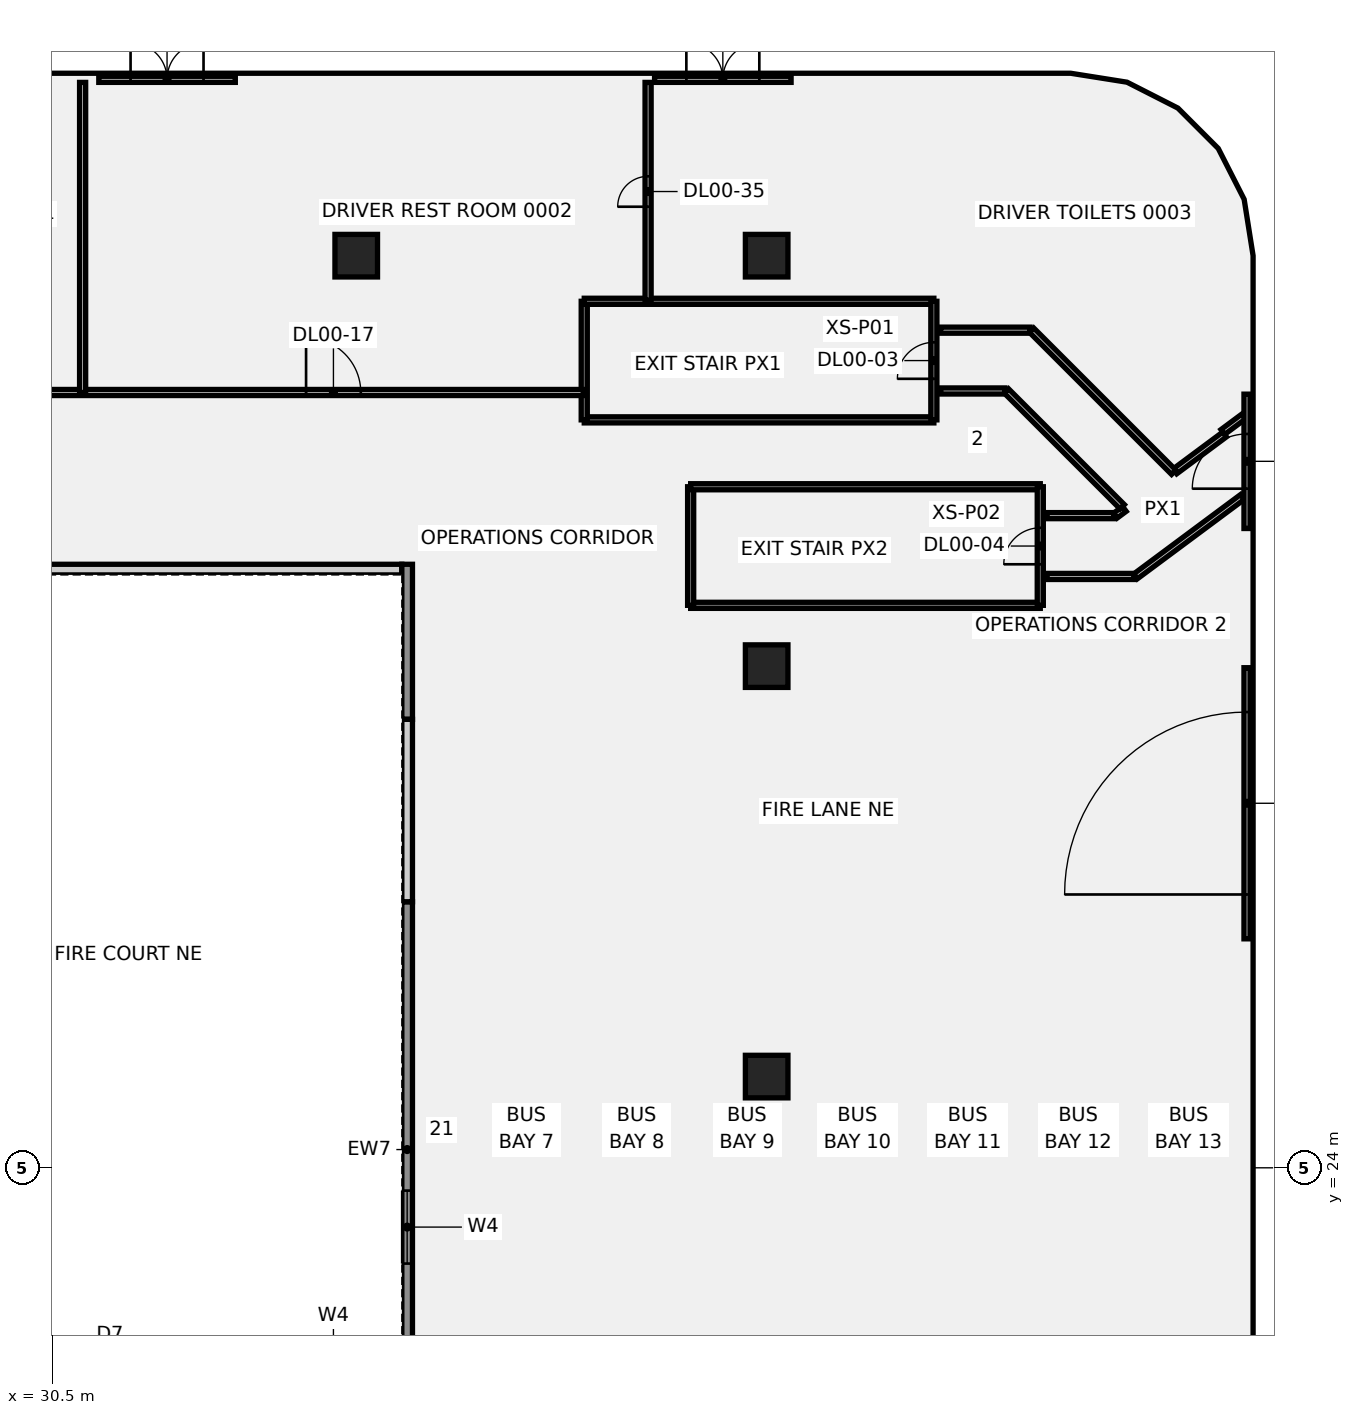
"""IFC4 building model, lengths in metres.
Left out: names, types, materials, properties, quantities, classifications, styles, units other than length and angle.
Written with IfcOpenShell. Run it as: python <this file> out.ifc"""

import sys

from ifc_helpers import new_model, si_unit, direction, frame, frame_2d, origin, origin_2d, place, context, subcontext, project, spatial, rectangle, extrude, element, fill, save


model = new_model("IFC4")
c1 = context("Model", 3, precision=1e-05, world=origin(), true_north=direction((0.0, 1.0)))
c2 = subcontext(c1, "Body", "Model", "MODEL_VIEW")
j1 = project(units=[si_unit("LENGTHUNIT", "METRE"), si_unit("PLANEANGLEUNIT", "RADIAN")], contexts=[c1])
p1 = place(None, origin())
s1 = spatial("IfcSite", under=j1, at=p1, CompositionType="ELEMENT")
p2 = place(p1, origin())
s2 = spatial("IfcBuilding", under=s1, at=p2, CompositionType="ELEMENT")
p3 = place(p2, origin())
s3 = spatial("IfcBuildingStorey", under=s2, at=p3, CompositionType="ELEMENT", Elevation=0.0)
for number, where, z_axis, x_axis in (
    (1, (40.5, 54.0, -0.55), (0.0, 0.0, 1.0), (1.0, 0.0, 0.0)),
    (2, (54.0, 27.0, -0.55), (0.0, 0.0, 1.0), (1.0, 0.0, 0.0)),
    (3, (54.0, 40.5, -0.55), (0.0, 0.0, 1.0), (1.0, 0.0, 0.0)),
    (4, (54.0, 54.0, -0.55), (0.0, 0.0, 1.0), (1.0, 0.0, 0.0)),
):
    element("IfcColumn", number, at=place(p3, frame(where, z_axis=z_axis, x_axis=x_axis)), inside=s3, PredefinedType="COLUMN", context=c2, shape_type="SweptSolid", body=[
        extrude(rectangle(XDim=1.4, YDim=1.4, at=origin_2d()), origin(), (0.0, 0.0, 1.0), 9.05),
    ])
p4 = place(p3, frame((48.0, 48.6, 0.0), z_axis=(0.0, 0.0, 1.0), x_axis=(1.0, 0.0, 0.0)))
e5 = element("IfcWall", 5, at=p4, inside=s3, PredefinedType="PARTITIONING", context=c2, shape_type="SweptSolid", body=[
    extrude(rectangle(XDim=11.5, YDim=0.2, at=frame_2d((5.75, 0.0))), origin(), (0.0, 0.0, 1.0), 8.5),
])
p5 = place(p3, frame((48.0, 48.6, 0.0), z_axis=(0.0, 0.0, 1.0), x_axis=(0.0, 1.0, 0.0)))
e6 = element("IfcWall", 6, at=p5, inside=s3, PredefinedType="PARTITIONING", context=c2, shape_type="SweptSolid", body=[
    extrude(rectangle(XDim=3.9, YDim=0.2, at=frame_2d((1.95, 0.0))), origin(), (0.0, 0.0, 1.0), 8.5),
])
p6 = place(p3, frame((48.0, 52.5, 0.0), z_axis=(0.0, 0.0, 1.0), x_axis=(1.0, 0.0, 0.0)))
e7 = element("IfcWall", 7, at=p6, inside=s3, PredefinedType="PARTITIONING", context=c2, shape_type="SweptSolid", body=[
    extrude(rectangle(XDim=11.5, YDim=0.2, at=frame_2d((5.75, 0.0))), origin(), (0.0, 0.0, 1.0), 8.5),
])
p7 = place(p3, frame((59.5, 48.6, 0.0), z_axis=(0.0, 0.0, 1.0), x_axis=(0.0, 1.0, 0.0)))
e8 = element("IfcWall", 8, at=p7, inside=s3, PredefinedType="PARTITIONING", context=c2, shape_type="SweptSolid", body=[
    extrude(rectangle(XDim=3.9, YDim=0.2, at=frame_2d((1.95, 0.0))), origin(), (0.0, 0.0, 1.0), 8.5),
])
p8 = place(p7, frame((1.35, 0.0, 0.0)))
e9 = element("IfcOpeningElement", 9, at=p8, cuts=e8, PredefinedType="OPENING", context=c2, shape_type="SweptSolid", body=[
    extrude(rectangle(XDim=1.2, YDim=2.1, at=frame_2d((0.6, 1.05))), frame((0.0, 0.11, 0.0), z_axis=(0.0, -1.0, 0.0), x_axis=(1.0, 0.0, 0.0)), (0.0, 0.0, 1.0), 0.22),
])
p9 = place(p3, frame((51.5, 42.5, 0.0), z_axis=(0.0, 0.0, 1.0), x_axis=(1.0, 0.0, 0.0)))
e10 = element("IfcWall", 10, at=p9, inside=s3, PredefinedType="PARTITIONING", context=c2, shape_type="SweptSolid", body=[
    extrude(rectangle(XDim=11.5, YDim=0.2, at=frame_2d((5.75, 0.0))), origin(), (0.0, 0.0, 1.0), 8.5),
])
p10 = place(p3, frame((51.5, 42.5, 0.0), z_axis=(0.0, 0.0, 1.0), x_axis=(0.0, 1.0, 0.0)))
e11 = element("IfcWall", 11, at=p10, inside=s3, PredefinedType="PARTITIONING", context=c2, shape_type="SweptSolid", body=[
    extrude(rectangle(XDim=3.9, YDim=0.2, at=frame_2d((1.95, 0.0))), origin(), (0.0, 0.0, 1.0), 8.5),
])
p11 = place(p3, frame((51.5, 46.4, 0.0), z_axis=(0.0, 0.0, 1.0), x_axis=(1.0, 0.0, 0.0)))
e12 = element("IfcWall", 12, at=p11, inside=s3, PredefinedType="PARTITIONING", context=c2, shape_type="SweptSolid", body=[
    extrude(rectangle(XDim=11.5, YDim=0.2, at=frame_2d((5.75, 0.0))), origin(), (0.0, 0.0, 1.0), 8.5),
])
p12 = place(p3, frame((63.0, 42.5, 0.0), z_axis=(0.0, 0.0, 1.0), x_axis=(0.0, 1.0, 0.0)))
e13 = element("IfcWall", 13, at=p12, inside=s3, PredefinedType="PARTITIONING", context=c2, shape_type="SweptSolid", body=[
    extrude(rectangle(XDim=3.9, YDim=0.2, at=frame_2d((1.95, 0.0))), origin(), (0.0, 0.0, 1.0), 8.5),
])
p13 = place(p12, frame((1.35, 0.0, 0.0)))
e14 = element("IfcOpeningElement", 14, at=p13, cuts=e13, PredefinedType="OPENING", context=c2, shape_type="SweptSolid", body=[
    extrude(rectangle(XDim=1.2, YDim=2.1, at=frame_2d((0.6, 1.05))), frame((0.0, 0.11, 0.0), z_axis=(0.0, -1.0, 0.0), x_axis=(1.0, 0.0, 0.0)), (0.0, 0.0, 1.0), 0.22),
])
p14 = place(p3, frame((19.53, 49.5, 0.0), z_axis=(0.0, 0.0, 1.0), x_axis=(1.0, 0.0, 0.0)))
e15 = element("IfcWall", 15, at=p14, inside=s3, PredefinedType="PARTITIONING", context=c2, shape_type="SweptSolid", body=[
    extrude(rectangle(XDim=28.44, YDim=0.2, at=frame_2d((14.22, 0.0))), origin(), (0.0, 0.0, 1.0), 8.5),
])
p15 = place(p14, frame((5.222, 0.0, 0.0)))
e16 = element("IfcOpeningElement", 16, at=p15, cuts=e15, PredefinedType="OPENING", context=c2, shape_type="SweptSolid", body=[
    extrude(rectangle(XDim=1.8, YDim=2.1, at=frame_2d((0.9, 1.05))), frame((0.0, 0.11, 0.0), z_axis=(0.0, -1.0, 0.0), x_axis=(1.0, 0.0, 0.0)), (0.0, 0.0, 1.0), 0.22),
])
p16 = place(p14, frame((19.32, 0.0, 0.0)))
e17 = element("IfcOpeningElement", 17, at=p16, cuts=e15, PredefinedType="OPENING", context=c2, shape_type="SweptSolid", body=[
    extrude(rectangle(XDim=1.8, YDim=2.1, at=frame_2d((0.9, 1.05))), frame((0.0, 0.11, 0.0), z_axis=(0.0, -1.0, 0.0), x_axis=(1.0, 0.0, 0.0)), (0.0, 0.0, 1.0), 0.22),
])
p17 = place(p3, frame((31.5, 49.5, 0.0), z_axis=(0.0, 0.0, 1.0), x_axis=(0.0, 1.0, 0.0)))
e18 = element("IfcWall", 18, at=p17, inside=s3, PredefinedType="PARTITIONING", context=c2, shape_type="SweptSolid", body=[
    extrude(rectangle(XDim=10.199, YDim=0.2, at=frame_2d((5.1, 0.0))), origin(), (0.0, 0.0, 1.0), 8.5),
])
p18 = place(p3, frame((50.1, 52.53, 0.0), z_axis=(0.0, 0.0, 1.0), x_axis=(0.0, 1.0, 0.0)))
e19 = element("IfcWall", 19, at=p18, inside=s3, PredefinedType="PARTITIONING", context=c2, shape_type="SweptSolid", body=[
    extrude(rectangle(XDim=7.169, YDim=0.2, at=frame_2d((3.584, 0.0))), origin(), (0.0, 0.0, 1.0), 8.5),
])
p19 = place(p18, frame((3.08, 0.0, 0.0)))
e20 = element("IfcOpeningElement", 20, at=p19, cuts=e19, PredefinedType="OPENING", context=c2, shape_type="SweptSolid", body=[
    extrude(rectangle(XDim=1.0, YDim=2.1, at=frame_2d((0.5, 1.05))), frame((0.0, 0.11, 0.0), z_axis=(0.0, -1.0, 0.0), x_axis=(1.0, 0.0, 0.0)), (0.0, 0.0, 1.0), 0.22),
])
p20 = place(p3, frame((69.004, 48.2, 0.0), z_axis=(0.0, 0.0, 1.0), x_axis=(0.802832514658, 0.596204623772, 0.0)))
e21 = element("IfcWall", 21, at=p20, inside=s3, PredefinedType="PARTITIONING", context=c2, shape_type="SweptSolid", body=[
    extrude(rectangle(XDim=0.866, YDim=0.2, at=frame_2d((0.433, 0.0))), origin(), (0.0, 0.0, 1.0), 8.5),
])
p21 = place(p3, frame((63.22, 45.45, 0.0), z_axis=(0.0, 0.0, 1.0), x_axis=(1.0, 0.0, 0.0)))
e22 = element("IfcWall", 22, at=p21, inside=s3, PredefinedType="PARTITIONING", context=c2, shape_type="SweptSolid", body=[
    extrude(rectangle(XDim=2.199, YDim=0.2, at=frame_2d((1.1, 0.0))), origin(), (0.0, 0.0, 1.0), 8.5),
])
p22 = place(p3, frame((65.469, 45.45, 0.0), z_axis=(0.0, 0.0, 1.0), x_axis=(0.802680749931, 0.596408931599, 0.0)))
e23 = element("IfcWall", 23, at=p22, inside=s3, PredefinedType="PARTITIONING", context=c2, shape_type="SweptSolid", body=[
    extrude(rectangle(XDim=0.37, YDim=0.2, at=frame_2d((0.185, 0.0))), origin(), (0.0, 0.0, 1.0), 8.5),
])
p23 = place(p3, frame((67.43, 46.906, 0.0), z_axis=(0.0, 0.0, 1.0), x_axis=(0.802697910389, 0.596385835393, 0.0)))
e24 = element("IfcWall", 24, at=p23, inside=s3, PredefinedType="PARTITIONING", context=c2, shape_type="SweptSolid", body=[
    extrude(rectangle(XDim=2.035, YDim=0.2, at=frame_2d((1.018, 0.0))), origin(), (0.0, 0.0, 1.0), 8.5),
])
p24 = place(p3, frame((63.22, 43.45, 0.0), z_axis=(0.0, 0.0, 1.0), x_axis=(1.0, 0.0, 0.0)))
e25 = element("IfcWall", 25, at=p24, inside=s3, PredefinedType="PARTITIONING", context=c2, shape_type="SweptSolid", body=[
    extrude(rectangle(XDim=2.861, YDim=0.2, at=frame_2d((1.43, 0.0))), origin(), (0.0, 0.0, 1.0), 8.5),
])
p25 = place(p3, frame((66.131, 43.45, 0.0), z_axis=(0.0, 0.0, 1.0), x_axis=(0.802731660779, 0.5963404068, 0.0)))
e26 = element("IfcWall", 26, at=p25, inside=s3, PredefinedType="PARTITIONING", context=c2, shape_type="SweptSolid", body=[
    extrude(rectangle(XDim=4.384, YDim=0.2, at=frame_2d((2.192, 0.0))), origin(), (0.0, 0.0, 1.0), 8.5),
])
p26 = place(p3, frame((59.72, 51.55, 0.0), z_axis=(0.0, 0.0, 1.0), x_axis=(1.0, 0.0, 0.0)))
e27 = element("IfcWall", 27, at=p26, inside=s3, PredefinedType="PARTITIONING", context=c2, shape_type="SweptSolid", body=[
    extrude(rectangle(XDim=2.944, YDim=0.2, at=frame_2d((1.472, 0.0))), origin(), (0.0, 0.0, 1.0), 8.5),
])
p27 = place(p3, frame((62.714, 51.55, 0.0), z_axis=(0.0, 0.0, 1.0), x_axis=(0.707236029221, -0.706977509523, 0.0)))
e28 = element("IfcWall", 28, at=p27, inside=s3, PredefinedType="PARTITIONING", context=c2, shape_type="SweptSolid", body=[
    extrude(rectangle(XDim=6.611, YDim=0.2, at=frame_2d((3.305, 0.0))), origin(), (0.0, 0.0, 1.0), 8.5),
])
p28 = place(p3, frame((59.72, 49.55, 0.0), z_axis=(0.0, 0.0, 1.0), x_axis=(1.0, 0.0, 0.0)))
e29 = element("IfcWall", 29, at=p28, inside=s3, PredefinedType="PARTITIONING", context=c2, shape_type="SweptSolid", body=[
    extrude(rectangle(XDim=2.116, YDim=0.2, at=frame_2d((1.058, 0.0))), origin(), (0.0, 0.0, 1.0), 8.5),
])
p29 = place(p3, frame((61.886, 49.55, 0.0), z_axis=(0.0, 0.0, 1.0), x_axis=(0.707220072345, -0.706993471874, 0.0)))
e30 = element("IfcWall", 30, at=p29, inside=s3, PredefinedType="PARTITIONING", context=c2, shape_type="SweptSolid", body=[
    extrude(rectangle(XDim=5.387, YDim=0.2, at=frame_2d((2.693, 0.0))), origin(), (0.0, 0.0, 1.0), 8.5),
])
p30 = place(p3, frame((69.8, 31.531, 0.0), z_axis=(0.0, 0.0, 1.0), x_axis=(0.0, 1.0, 0.0)))
e31 = element("IfcWall", 31, at=p30, inside=s3, PredefinedType="SOLIDWALL", context=c2, shape_type="SweptSolid", body=[
    extrude(rectangle(XDim=8.917, YDim=0.2, at=frame_2d((4.459, 0.0))), origin(), (0.0, 0.0, 1.0), 4.9),
])
p31 = place(p30, frame((1.459, 0.0, 0.0)))
e32 = element("IfcOpeningElement", 32, at=p31, cuts=e31, PredefinedType="OPENING", context=c2, shape_type="SweptSolid", body=[
    extrude(rectangle(XDim=6.0, YDim=4.5, at=frame_2d((3.0, 2.25))), frame((0.0, 0.11, 0.0), z_axis=(0.0, -1.0, 0.0), x_axis=(1.0, 0.0, 0.0)), (0.0, 0.0, 1.0), 0.22),
])
p32 = place(p3, frame((69.8, 45.027, 0.0), z_axis=(0.0, 0.0, 1.0), x_axis=(0.0, 1.0, 0.0)))
e33 = element("IfcWall", 33, at=p32, inside=s3, PredefinedType="SOLIDWALL", context=c2, shape_type="SweptSolid", body=[
    extrude(rectangle(XDim=4.419, YDim=0.2, at=frame_2d((2.209, 0.0))), origin(), (0.0, 0.0, 1.0), 2.9),
])
p33 = place(p32, frame((1.309, 0.0, 0.0)))
e34 = element("IfcOpeningElement", 34, at=p33, cuts=e33, PredefinedType="OPENING", context=c2, shape_type="SweptSolid", body=[
    extrude(rectangle(XDim=1.8, YDim=2.4, at=frame_2d((0.9, 1.2))), frame((0.0, 0.11, 0.0), z_axis=(0.0, -1.0, 0.0), x_axis=(1.0, 0.0, 0.0)), (0.0, 0.0, 1.0), 0.22),
])
p34 = place(p3, frame((54.804, 59.8, 0.0), z_axis=(0.0, 0.0, 1.0), x_axis=(-1.0, 0.0, 0.0)))
e35 = element("IfcWall", 35, at=p34, inside=s3, PredefinedType="SOLIDWALL", context=c2, shape_type="SweptSolid", body=[
    extrude(rectangle(XDim=4.49, YDim=0.2, at=frame_2d((2.245, 0.0))), origin(), (0.0, 0.0, 1.0), 2.9),
])
p35 = place(p34, frame((1.045, 0.0, 0.0)))
e36 = element("IfcOpeningElement", 36, at=p35, cuts=e35, PredefinedType="OPENING", context=c2, shape_type="SweptSolid", body=[
    extrude(rectangle(XDim=2.4, YDim=2.4, at=frame_2d((1.2, 1.2))), frame((0.0, 0.11, 0.0), z_axis=(0.0, -1.0, 0.0), x_axis=(1.0, 0.0, 0.0)), (0.0, 0.0, 1.0), 0.22),
])
p36 = place(p3, frame((36.522, 59.8, 0.0), z_axis=(0.0, 0.0, 1.0), x_axis=(-1.0, 0.0, 0.0)))
e37 = element("IfcWall", 37, at=p36, inside=s3, PredefinedType="SOLIDWALL", context=c2, shape_type="SweptSolid", body=[
    extrude(rectangle(XDim=4.49, YDim=0.2, at=frame_2d((2.245, 0.0))), origin(), (0.0, 0.0, 1.0), 2.9),
])
p37 = place(p36, frame((1.045, 0.0, 0.0)))
e38 = element("IfcOpeningElement", 38, at=p37, cuts=e37, PredefinedType="OPENING", context=c2, shape_type="SweptSolid", body=[
    extrude(rectangle(XDim=2.4, YDim=2.4, at=frame_2d((1.2, 1.2))), frame((0.0, 0.11, 0.0), z_axis=(0.0, -1.0, 0.0), x_axis=(1.0, 0.0, 0.0)), (0.0, 0.0, 1.0), 0.22),
])
p38 = place(p3, frame((24.0, 43.675, 0.0), z_axis=(0.0, 0.0, 1.0), x_axis=(1.0, 0.0, 0.0)))
e39 = element("IfcWall", 39, at=p38, inside=s3, PredefinedType="SOLIDWALL", context=c2, shape_type="SweptSolid", body=[
    extrude(rectangle(XDim=18.0, YDim=0.35, at=frame_2d((9.0, 0.0))), origin(), (0.0, 0.0, 1.0), 8.5),
])
p39 = place(p3, frame((42.175, 16.45, 0.0), z_axis=(0.0, 0.0, 1.0), x_axis=(0.0, 1.0, 0.0)))
e40 = element("IfcWall", 40, at=p39, inside=s3, PredefinedType="SOLIDWALL", context=c2, shape_type="SweptSolid", body=[
    extrude(rectangle(XDim=16.3, YDim=0.35, at=frame_2d((8.15, 0.0))), origin(), (0.0, 0.0, 1.0), 8.5),
])
p40 = place(p39, frame((4.4, 0.0, 1.0)))
e41 = element("IfcOpeningElement", 41, at=p40, cuts=e40, PredefinedType="OPENING", context=c2, shape_type="SweptSolid", body=[
    extrude(rectangle(XDim=2.4, YDim=1.8, at=frame_2d((1.2, 0.9))), frame((0.0, 0.185, 0.0), z_axis=(0.0, -1.0, 0.0), x_axis=(1.0, 0.0, 0.0)), (0.0, 0.0, 1.0), 0.37),
])
p41 = place(p3, frame((42.175, 38.75, 0.0), z_axis=(0.0, 0.0, 1.0), x_axis=(0.0, 1.0, 0.0)))
e42 = element("IfcWall", 42, at=p41, inside=s3, PredefinedType="SOLIDWALL", context=c2, shape_type="SweptSolid", body=[
    extrude(rectangle(XDim=5.1, YDim=0.35, at=frame_2d((2.55, 0.0))), origin(), (0.0, 0.0, 1.0), 8.5),
])
p42 = place(p3, frame((42.175, 32.75, 4.9), z_axis=(0.0, 0.0, 1.0), x_axis=(0.0, 1.0, 0.0)))
e43 = element("IfcWall", 43, at=p42, inside=s3, PredefinedType="SOLIDWALL", context=c2, shape_type="SweptSolid", body=[
    extrude(rectangle(XDim=6.0, YDim=0.35, at=frame_2d((3.0, 0.0))), origin(), (0.0, 0.0, 1.0), 3.6),
])
p43 = place(p8, origin())
e44 = element("IfcDoor", 44, at=p43, inside=s3, OperationType="SINGLE_SWING_LEFT", PredefinedType="DOOR", context=c2, shape_type="SweptSolid", body=[
    extrude(rectangle(XDim=1.2, YDim=2.1, at=frame_2d((0.6, 1.05))), frame((0.0, 0.025, 0.0), z_axis=(0.0, -1.0, 0.0), x_axis=(1.0, 0.0, 0.0)), (0.0, 0.0, 1.0), 0.05),
])
fill(e9, e44)
p44 = place(p13, origin())
e45 = element("IfcDoor", 45, at=p44, inside=s3, OperationType="SINGLE_SWING_RIGHT", PredefinedType="DOOR", context=c2, shape_type="SweptSolid", body=[
    extrude(rectangle(XDim=1.2, YDim=2.1, at=frame_2d((0.6, 1.05))), frame((0.0, 0.025, 0.0), z_axis=(0.0, -1.0, 0.0), x_axis=(1.0, 0.0, 0.0)), (0.0, 0.0, 1.0), 0.05),
])
fill(e14, e45)
p45 = place(p16, origin())
e46 = element("IfcDoor", 46, at=p45, inside=s3, OperationType="SINGLE_SWING_LEFT", PredefinedType="DOOR", context=c2, shape_type="SweptSolid", body=[
    extrude(rectangle(XDim=1.8, YDim=2.1, at=frame_2d((0.9, 1.05))), frame((0.0, 0.025, 0.0), z_axis=(0.0, -1.0, 0.0), x_axis=(1.0, 0.0, 0.0)), (0.0, 0.0, 1.0), 0.05),
])
fill(e17, e46)
p46 = place(p19, origin())
e47 = element("IfcDoor", 47, at=p46, inside=s3, OperationType="SINGLE_SWING_LEFT", PredefinedType="DOOR", context=c2, shape_type="SweptSolid", body=[
    extrude(rectangle(XDim=1.0, YDim=2.1, at=frame_2d((0.5, 1.05))), frame((0.0, 0.025, 0.0), z_axis=(0.0, -1.0, 0.0), x_axis=(1.0, 0.0, 0.0)), (0.0, 0.0, 1.0), 0.05),
])
fill(e20, e47)
p47 = place(p31, origin())
e48 = element("IfcDoor", 48, at=p47, inside=s3, OperationType="SINGLE_SWING_LEFT", PredefinedType="DOOR", context=c2, shape_type="SweptSolid", body=[
    extrude(rectangle(XDim=6.0, YDim=4.5, at=frame_2d((3.0, 2.25))), frame((0.0, 0.025, 0.0), z_axis=(0.0, -1.0, 0.0), x_axis=(1.0, 0.0, 0.0)), (0.0, 0.0, 1.0), 0.05),
])
fill(e32, e48)
p48 = place(p33, frame((1.8, 0.0, 0.0), z_axis=(0.0, 0.0, 1.0), x_axis=(-1.0, 0.0, 0.0)))
e49 = element("IfcDoor", 49, at=p48, inside=s3, OperationType="SINGLE_SWING_LEFT", PredefinedType="DOOR", context=c2, shape_type="SweptSolid", body=[
    extrude(rectangle(XDim=1.8, YDim=2.4, at=frame_2d((0.9, 1.2))), frame((0.0, 0.025, 0.0), z_axis=(0.0, -1.0, 0.0), x_axis=(1.0, 0.0, 0.0)), (0.0, 0.0, 1.0), 0.05),
])
fill(e34, e49)
p49 = place(p35, frame((2.4, 0.0, 0.0), z_axis=(0.0, 0.0, 1.0), x_axis=(-1.0, 0.0, 0.0)))
e50 = element("IfcDoor", 50, at=p49, inside=s3, OperationType="DOUBLE_DOOR_DOUBLE_SWING", PredefinedType="DOOR", context=c2, shape_type="SweptSolid", body=[
    extrude(rectangle(XDim=2.4, YDim=2.4, at=frame_2d((1.2, 1.2))), frame((0.0, 0.025, 0.0), z_axis=(0.0, -1.0, 0.0), x_axis=(1.0, 0.0, 0.0)), (0.0, 0.0, 1.0), 0.05),
])
fill(e36, e50)
p50 = place(p37, frame((2.4, 0.0, 0.0), z_axis=(0.0, 0.0, 1.0), x_axis=(-1.0, 0.0, 0.0)))
e51 = element("IfcDoor", 51, at=p50, inside=s3, OperationType="DOUBLE_DOOR_DOUBLE_SWING", PredefinedType="DOOR", context=c2, shape_type="SweptSolid", body=[
    extrude(rectangle(XDim=2.4, YDim=2.4, at=frame_2d((1.2, 1.2))), frame((0.0, 0.025, 0.0), z_axis=(0.0, -1.0, 0.0), x_axis=(1.0, 0.0, 0.0)), (0.0, 0.0, 1.0), 0.05),
])
fill(e38, e51)
p51 = place(p40, origin())
e52 = element("IfcWindow", 52, at=p51, inside=s3, PartitioningType="SINGLE_PANEL", PredefinedType="WINDOW", context=c2, shape_type="SweptSolid", body=[
    extrude(rectangle(XDim=2.4, YDim=1.8, at=frame_2d((1.2, 0.9))), frame((0.0, 0.03, 0.0), z_axis=(0.0, -1.0, 0.0), x_axis=(1.0, 0.0, 0.0)), (0.0, 0.0, 1.0), 0.06),
])
fill(e41, e52)
save(model, sys.argv[1])
